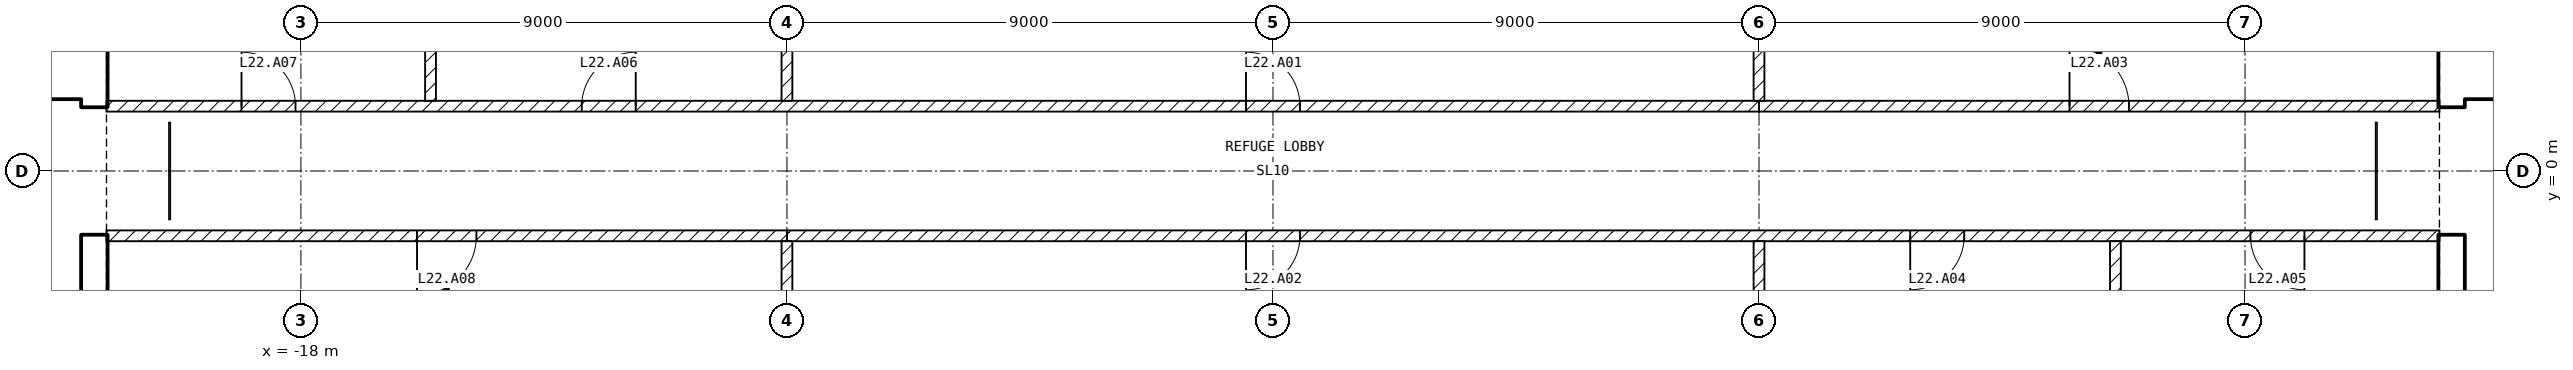
"""IFC4 building model, lengths in metres.
Left out: names, types, materials, properties, quantities, classifications, styles, units other than length and angle.
Written with IfcOpenShell. Run it as: python <this file> out.ifc"""

import sys

from ifc_helpers import new_model, si_unit, direction, frame, frame_2d, origin, place, context, subcontext, project, spatial, rectangle, extrude, element, fill, save


model = new_model("IFC4")
c1 = context("Model", 3, precision=1e-05, world=origin(), true_north=direction((0.0, 1.0)))
c2 = subcontext(c1, "Body", "Model", "MODEL_VIEW")
j1 = project(units=[si_unit("LENGTHUNIT", "METRE"), si_unit("PLANEANGLEUNIT", "RADIAN")], contexts=[c1])
p1 = place(None, origin())
s1 = spatial("IfcSite", under=j1, at=p1, CompositionType="ELEMENT")
p2 = place(p1, origin())
s2 = spatial("IfcBuilding", under=s1, at=p2, CompositionType="ELEMENT")
p3 = place(p2, frame((0.0, 0.0, 97.9)))
s3 = spatial("IfcBuildingStorey", under=s2, at=p3, CompositionType="ELEMENT", Elevation=97.9)
for number, where, z_axis, x_axis in (
    (1, (21.825, -8.1, 0.0), (0.0, 0.0, 1.0), (0.0, 1.0, 0.0)),
    (2, (21.825, 1.2, 0.0), (0.0, 0.0, 1.0), (0.0, 1.0, 0.0)),
):
    element("IfcWall", number, at=place(p3, frame(where, z_axis=z_axis, x_axis=x_axis)), inside=s3, PredefinedType="SHEAR", context=c2, shape_type="SweptSolid", body=[
        extrude(rectangle(XDim=6.9, YDim=0.45, at=frame_2d((3.45, 0.0))), origin(), (0.0, 0.0, 1.0), 4.25),
    ])
p4 = place(p3, frame((22.05, 1.45, 0.0), z_axis=(0.0, 0.0, 1.0), x_axis=(1.0, 0.0, 0.0)))
e3 = element("IfcWall", 3, at=p4, inside=s3, PredefinedType="SOLIDWALL", context=c2, shape_type="SweptSolid", body=[
    extrude(rectangle(XDim=13.05, YDim=0.2, at=frame_2d((6.525, 0.0))), origin(), (0.0, 0.0, 1.0), 4.25),
])
p5 = place(p4, frame((0.75, 0.0, 0.0)))
e4 = element("IfcOpeningElement", 4, at=p5, cuts=e3, PredefinedType="OPENING", context=c2, shape_type="SweptSolid", body=[
    extrude(rectangle(XDim=1.0, YDim=2.1, at=frame_2d((0.5, 1.05))), frame((0.0, 0.11, 0.0), z_axis=(0.0, -1.0, 0.0), x_axis=(1.0, 0.0, 0.0)), (0.0, 0.0, 1.0), 0.22),
])
p6 = place(p4, frame((3.25, 0.0, 0.0)))
e5 = element("IfcOpeningElement", 5, at=p6, cuts=e3, PredefinedType="OPENING", context=c2, shape_type="SweptSolid", body=[
    extrude(rectangle(XDim=1.0, YDim=2.1, at=frame_2d((0.5, 1.05))), frame((0.0, 0.11, 0.0), z_axis=(0.0, -1.0, 0.0), x_axis=(1.0, 0.0, 0.0)), (0.0, 0.0, 1.0), 0.22),
])
p7 = place(p4, frame((10.0, 0.0, 0.0)))
e6 = element("IfcOpeningElement", 6, at=p7, cuts=e3, PredefinedType="OPENING", context=c2, shape_type="SweptSolid", body=[
    extrude(rectangle(XDim=0.9, YDim=2.1, at=frame_2d((0.45, 1.05))), frame((0.0, 0.11, 0.0), z_axis=(0.0, -1.0, 0.0), x_axis=(1.0, 0.0, 0.0)), (0.0, 0.0, 1.0), 0.22),
])
for number, where, z_axis, x_axis in (
    (7, (-21.825, -8.1, 0.0), (0.0, 0.0, 1.0), (0.0, 1.0, 0.0)),
    (8, (-21.825, 1.2, 0.0), (0.0, 0.0, 1.0), (0.0, 1.0, 0.0)),
):
    element("IfcWall", number, at=place(p3, frame(where, z_axis=z_axis, x_axis=x_axis)), inside=s3, PredefinedType="SHEAR", context=c2, shape_type="SweptSolid", body=[
        extrude(rectangle(XDim=6.9, YDim=0.45, at=frame_2d((3.45, 0.0))), origin(), (0.0, 0.0, 1.0), 4.25),
    ])
p8 = place(p3, frame((-35.1, 1.45, 0.0), z_axis=(0.0, 0.0, 1.0), x_axis=(1.0, 0.0, 0.0)))
e9 = element("IfcWall", 9, at=p8, inside=s3, PredefinedType="SOLIDWALL", context=c2, shape_type="SweptSolid", body=[
    extrude(rectangle(XDim=13.05, YDim=0.2, at=frame_2d((6.525, 0.0))), origin(), (0.0, 0.0, 1.0), 4.25),
])
p9 = place(p8, frame((11.3, 0.0, 0.0)))
e10 = element("IfcOpeningElement", 10, at=p9, cuts=e9, PredefinedType="OPENING", context=c2, shape_type="SweptSolid", body=[
    extrude(rectangle(XDim=1.0, YDim=2.1, at=frame_2d((0.5, 1.05))), frame((0.0, 0.11, 0.0), z_axis=(0.0, -1.0, 0.0), x_axis=(1.0, 0.0, 0.0)), (0.0, 0.0, 1.0), 0.22),
])
p10 = place(p8, frame((8.8, 0.0, 0.0)))
e11 = element("IfcOpeningElement", 11, at=p10, cuts=e9, PredefinedType="OPENING", context=c2, shape_type="SweptSolid", body=[
    extrude(rectangle(XDim=1.0, YDim=2.1, at=frame_2d((0.5, 1.05))), frame((0.0, 0.11, 0.0), z_axis=(0.0, -1.0, 0.0), x_axis=(1.0, 0.0, 0.0)), (0.0, 0.0, 1.0), 0.22),
])
p11 = place(p8, frame((2.15, 0.0, 0.0)))
e12 = element("IfcOpeningElement", 12, at=p11, cuts=e9, PredefinedType="OPENING", context=c2, shape_type="SweptSolid", body=[
    extrude(rectangle(XDim=0.9, YDim=2.1, at=frame_2d((0.45, 1.05))), frame((0.0, 0.11, 0.0), z_axis=(0.0, -1.0, 0.0), x_axis=(1.0, 0.0, 0.0)), (0.0, 0.0, 1.0), 0.22),
])
p12 = place(p3, frame((-21.6, 1.2, 0.0), z_axis=(0.0, 0.0, 1.0), x_axis=(1.0, 0.0, 0.0)))
e13 = element("IfcWall", 13, at=p12, inside=s3, PredefinedType="PARTITIONING", context=c2, shape_type="SweptSolid", body=[
    extrude(rectangle(XDim=30.6, YDim=0.2, at=frame_2d((15.3, 0.0))), origin(), (0.0, 0.0, 1.0), 4.25),
])
p13 = place(p12, frame((21.1, 0.0, 0.0)))
e14 = element("IfcOpeningElement", 14, at=p13, cuts=e13, PredefinedType="OPENING", context=c2, shape_type="SweptSolid", body=[
    extrude(rectangle(XDim=1.0, YDim=2.1, at=frame_2d((0.5, 1.05))), frame((0.0, 0.11, 0.0), z_axis=(0.0, -1.0, 0.0), x_axis=(1.0, 0.0, 0.0)), (0.0, 0.0, 1.0), 0.22),
])
p14 = place(p12, frame((8.8, 0.0, 0.0)))
e15 = element("IfcOpeningElement", 15, at=p14, cuts=e13, PredefinedType="OPENING", context=c2, shape_type="SweptSolid", body=[
    extrude(rectangle(XDim=1.0, YDim=2.1, at=frame_2d((0.5, 1.05))), frame((0.0, 0.11, 0.0), z_axis=(0.0, -1.0, 0.0), x_axis=(1.0, 0.0, 0.0)), (0.0, 0.0, 1.0), 0.22),
])
p15 = place(p12, frame((2.5, 0.0, 0.0)))
e16 = element("IfcOpeningElement", 16, at=p15, cuts=e13, PredefinedType="OPENING", context=c2, shape_type="SweptSolid", body=[
    extrude(rectangle(XDim=1.0, YDim=2.1, at=frame_2d((0.5, 1.05))), frame((0.0, 0.11, 0.0), z_axis=(0.0, -1.0, 0.0), x_axis=(1.0, 0.0, 0.0)), (0.0, 0.0, 1.0), 0.22),
])
p16 = place(p3, frame((21.6, -1.2, 0.0), z_axis=(0.0, 0.0, 1.0), x_axis=(-1.0, 0.0, 0.0)))
e17 = element("IfcWall", 17, at=p16, inside=s3, PredefinedType="PARTITIONING", context=c2, shape_type="SweptSolid", body=[
    extrude(rectangle(XDim=30.6, YDim=0.2, at=frame_2d((15.3, 0.0))), origin(), (0.0, 0.0, 1.0), 4.25),
])
p17 = place(p16, frame((21.1, 0.0, 0.0)))
e18 = element("IfcOpeningElement", 18, at=p17, cuts=e17, PredefinedType="OPENING", context=c2, shape_type="SweptSolid", body=[
    extrude(rectangle(XDim=1.0, YDim=2.1, at=frame_2d((0.5, 1.05))), frame((0.0, 0.11, 0.0), z_axis=(0.0, -1.0, 0.0), x_axis=(1.0, 0.0, 0.0)), (0.0, 0.0, 1.0), 0.22),
])
p18 = place(p16, frame((8.8, 0.0, 0.0)))
e19 = element("IfcOpeningElement", 19, at=p18, cuts=e17, PredefinedType="OPENING", context=c2, shape_type="SweptSolid", body=[
    extrude(rectangle(XDim=1.0, YDim=2.1, at=frame_2d((0.5, 1.05))), frame((0.0, 0.11, 0.0), z_axis=(0.0, -1.0, 0.0), x_axis=(1.0, 0.0, 0.0)), (0.0, 0.0, 1.0), 0.22),
])
p19 = place(p16, frame((2.5, 0.0, 0.0)))
e20 = element("IfcOpeningElement", 20, at=p19, cuts=e17, PredefinedType="OPENING", context=c2, shape_type="SweptSolid", body=[
    extrude(rectangle(XDim=1.0, YDim=2.1, at=frame_2d((0.5, 1.05))), frame((0.0, 0.11, 0.0), z_axis=(0.0, -1.0, 0.0), x_axis=(1.0, 0.0, 0.0)), (0.0, 0.0, 1.0), 0.22),
])
p20 = place(p3, frame((9.0, 1.2, 0.0), z_axis=(0.0, 0.0, 1.0), x_axis=(1.0, 0.0, 0.0)))
e21 = element("IfcWall", 21, at=p20, inside=s3, PredefinedType="PARTITIONING", context=c2, shape_type="SweptSolid", body=[
    extrude(rectangle(XDim=12.6, YDim=0.2, at=frame_2d((6.3, 0.0))), origin(), (0.0, 0.0, 1.0), 4.25),
])
p21 = place(p20, frame((5.75, 0.0, 0.0)))
e22 = element("IfcOpeningElement", 22, at=p21, cuts=e21, PredefinedType="OPENING", context=c2, shape_type="SweptSolid", body=[
    extrude(rectangle(XDim=1.1, YDim=2.1, at=frame_2d((0.55, 1.05))), frame((0.0, 0.11, 0.0), z_axis=(0.0, -1.0, 0.0), x_axis=(1.0, 0.0, 0.0)), (0.0, 0.0, 1.0), 0.22),
])
p22 = place(p3, frame((-9.0, -1.2, 0.0), z_axis=(0.0, 0.0, 1.0), x_axis=(-1.0, 0.0, 0.0)))
e23 = element("IfcWall", 23, at=p22, inside=s3, PredefinedType="PARTITIONING", context=c2, shape_type="SweptSolid", body=[
    extrude(rectangle(XDim=12.6, YDim=0.2, at=frame_2d((6.3, 0.0))), origin(), (0.0, 0.0, 1.0), 4.25),
])
p23 = place(p22, frame((5.75, 0.0, 0.0)))
e24 = element("IfcOpeningElement", 24, at=p23, cuts=e23, PredefinedType="OPENING", context=c2, shape_type="SweptSolid", body=[
    extrude(rectangle(XDim=1.1, YDim=2.1, at=frame_2d((0.55, 1.05))), frame((0.0, 0.11, 0.0), z_axis=(0.0, -1.0, 0.0), x_axis=(1.0, 0.0, 0.0)), (0.0, 0.0, 1.0), 0.22),
])
for number, where, z_axis, x_axis in (
    (25, (9.0, 8.9, 0.0), (0.0, 0.0, 1.0), (0.0, -1.0, 0.0)),
    (26, (-9.0, 1.3, 0.0), (0.0, 0.0, 1.0), (0.0, 1.0, 0.0)),
    (27, (9.0, -1.3, 0.0), (0.0, 0.0, 1.0), (0.0, -1.0, 0.0)),
    (28, (-9.0, -8.9, 0.0), (0.0, 0.0, 1.0), (0.0, 1.0, 0.0)),
    (29, (15.6, -1.3, 0.0), (0.0, 0.0, 1.0), (0.0, -1.0, 0.0)),
    (30, (-15.6, 1.3, 0.0), (0.0, 0.0, 1.0), (0.0, 1.0, 0.0)),
):
    element("IfcWall", number, at=place(p3, frame(where, z_axis=z_axis, x_axis=x_axis)), inside=s3, PredefinedType="PARTITIONING", context=c2, shape_type="SweptSolid", body=[
        extrude(rectangle(XDim=7.6, YDim=0.2, at=frame_2d((3.8, 0.0))), origin(), (0.0, 0.0, 1.0), 4.25),
    ])
p24 = place(p13, origin())
e31 = element("IfcDoor", 31, at=p24, inside=s3, OperationType="SINGLE_SWING_LEFT", PredefinedType="DOOR", context=c2, shape_type="SweptSolid", body=[
    extrude(rectangle(XDim=1.0, YDim=2.1, at=frame_2d((0.5, 1.05))), frame((0.0, 0.025, 0.0), z_axis=(0.0, -1.0, 0.0), x_axis=(1.0, 0.0, 0.0)), (0.0, 0.0, 1.0), 0.05),
])
fill(e14, e31)
p25 = place(p17, origin())
e32 = element("IfcDoor", 32, at=p25, inside=s3, OperationType="SINGLE_SWING_RIGHT", PredefinedType="DOOR", context=c2, shape_type="SweptSolid", body=[
    extrude(rectangle(XDim=1.0, YDim=2.1, at=frame_2d((0.5, 1.05))), frame((0.0, 0.025, 0.0), z_axis=(0.0, -1.0, 0.0), x_axis=(1.0, 0.0, 0.0)), (0.0, 0.0, 1.0), 0.05),
])
fill(e18, e32)
p26 = place(p21, origin())
e33 = element("IfcDoor", 33, at=p26, inside=s3, OperationType="SINGLE_SWING_LEFT", PredefinedType="DOOR", context=c2, shape_type="SweptSolid", body=[
    extrude(rectangle(XDim=1.1, YDim=2.1, at=frame_2d((0.55, 1.05))), frame((0.0, 0.025, 0.0), z_axis=(0.0, -1.0, 0.0), x_axis=(1.0, 0.0, 0.0)), (0.0, 0.0, 1.0), 0.05),
])
fill(e22, e33)
p27 = place(p18, origin())
e34 = element("IfcDoor", 34, at=p27, inside=s3, OperationType="SINGLE_SWING_RIGHT", PredefinedType="DOOR", context=c2, shape_type="SweptSolid", body=[
    extrude(rectangle(XDim=1.0, YDim=2.1, at=frame_2d((0.5, 1.05))), frame((0.0, 0.025, 0.0), z_axis=(0.0, -1.0, 0.0), x_axis=(1.0, 0.0, 0.0)), (0.0, 0.0, 1.0), 0.05),
])
fill(e19, e34)
p28 = place(p19, origin())
e35 = element("IfcDoor", 35, at=p28, inside=s3, OperationType="SINGLE_SWING_LEFT", PredefinedType="DOOR", context=c2, shape_type="SweptSolid", body=[
    extrude(rectangle(XDim=1.0, YDim=2.1, at=frame_2d((0.5, 1.05))), frame((0.0, 0.025, 0.0), z_axis=(0.0, -1.0, 0.0), x_axis=(1.0, 0.0, 0.0)), (0.0, 0.0, 1.0), 0.05),
])
fill(e20, e35)
p29 = place(p14, origin())
e36 = element("IfcDoor", 36, at=p29, inside=s3, OperationType="SINGLE_SWING_RIGHT", PredefinedType="DOOR", context=c2, shape_type="SweptSolid", body=[
    extrude(rectangle(XDim=1.0, YDim=2.1, at=frame_2d((0.5, 1.05))), frame((0.0, 0.025, 0.0), z_axis=(0.0, -1.0, 0.0), x_axis=(1.0, 0.0, 0.0)), (0.0, 0.0, 1.0), 0.05),
])
fill(e15, e36)
p30 = place(p15, origin())
e37 = element("IfcDoor", 37, at=p30, inside=s3, OperationType="SINGLE_SWING_LEFT", PredefinedType="DOOR", context=c2, shape_type="SweptSolid", body=[
    extrude(rectangle(XDim=1.0, YDim=2.1, at=frame_2d((0.5, 1.05))), frame((0.0, 0.025, 0.0), z_axis=(0.0, -1.0, 0.0), x_axis=(1.0, 0.0, 0.0)), (0.0, 0.0, 1.0), 0.05),
])
fill(e16, e37)
p31 = place(p23, origin())
e38 = element("IfcDoor", 38, at=p31, inside=s3, OperationType="SINGLE_SWING_RIGHT", PredefinedType="DOOR", context=c2, shape_type="SweptSolid", body=[
    extrude(rectangle(XDim=1.1, YDim=2.1, at=frame_2d((0.55, 1.05))), frame((0.0, 0.025, 0.0), z_axis=(0.0, -1.0, 0.0), x_axis=(1.0, 0.0, 0.0)), (0.0, 0.0, 1.0), 0.05),
])
fill(e24, e38)
save(model, sys.argv[1])
